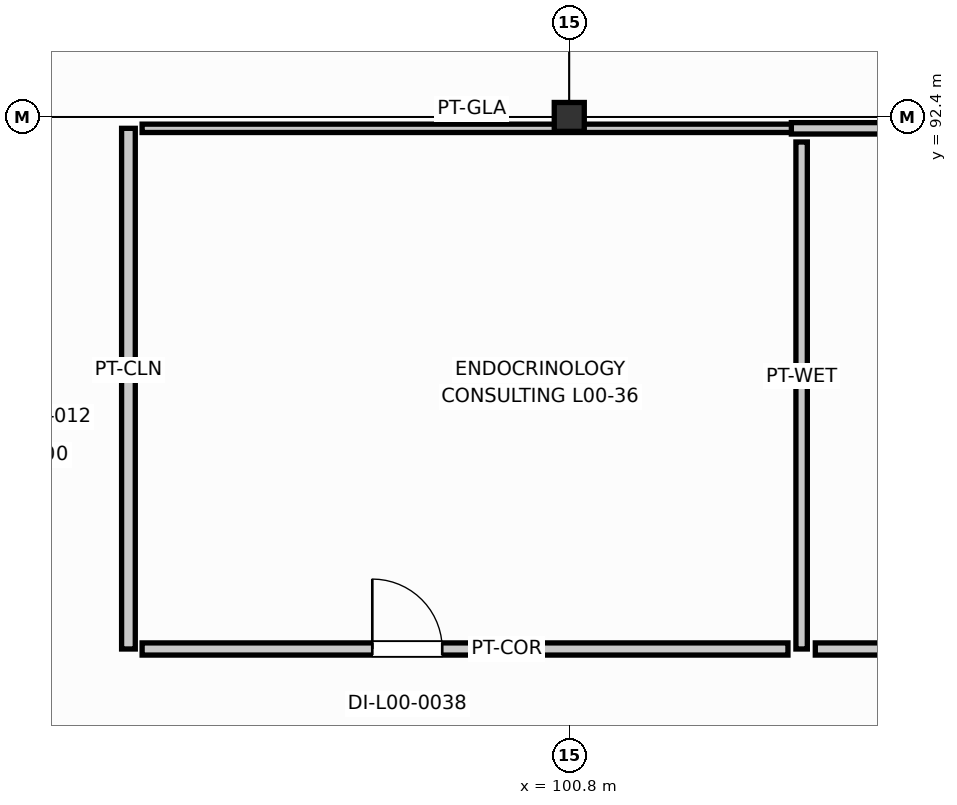
"""IFC4 building model, lengths in metres.
Left out: names, types, materials, properties, quantities, classifications, styles, units other than length and angle.
Written with IfcOpenShell. Run it as: python <this file> out.ifc"""

import sys

from ifc_helpers import new_model, si_unit, direction, frame, frame_2d, origin, origin_2d, place, context, subcontext, project, spatial, rectangle, i_section, extrude, element, fill, save


model = new_model("IFC4")
c1 = context("Model", 3, precision=1e-05, world=origin(), true_north=direction((0.0, 1.0)))
c2 = subcontext(c1, "Body", "Model", "MODEL_VIEW")
j1 = project(units=[si_unit("LENGTHUNIT", "METRE"), si_unit("PLANEANGLEUNIT", "RADIAN")], contexts=[c1])
p1 = place(None, origin())
s1 = spatial("IfcSite", under=j1, at=p1, CompositionType="ELEMENT")
p2 = place(p1, origin())
s2 = spatial("IfcBuilding", under=s1, at=p2, CompositionType="ELEMENT")
p3 = place(p2, origin())
s3 = spatial("IfcBuildingStorey", under=s2, at=p3, CompositionType="ELEMENT", Elevation=0.0)
p4 = place(p3, frame((100.8, 92.4, 0.0), z_axis=(0.0, 0.0, 1.0), x_axis=(1.0, 0.0, 0.0)))
e1 = element("IfcColumn", 1, at=p4, inside=s3, PredefinedType="COLUMN", context=c2, shape_type="SweptSolid", body=[
    extrude(i_section(OverallWidth=0.395, OverallDepth=0.38, WebThickness=0.019, FlangeThickness=0.03, FilletRadius=0.02, at=origin_2d()), origin(), (0.0, 0.0, 1.0), 4.8),
])
p5 = place(p3, frame((95.0, 85.4, 0.0), z_axis=(0.0, 0.0, 1.0), x_axis=(0.0, 1.0, 0.0)))
e2 = element("IfcWall", 2, at=p5, inside=s3, PredefinedType="PARTITIONING", context=c2, shape_type="SweptSolid", body=[
    extrude(rectangle(XDim=6.85, YDim=0.18, at=frame_2d((3.425, 0.0))), origin(), (0.0, 0.0, 1.0), 3.928),
])
p6 = place(p3, frame((95.18, 92.25, 0.0), z_axis=(0.0, 0.0, 1.0), x_axis=(1.0, 0.0, 0.0)))
e3 = element("IfcWall", 3, at=p6, inside=s3, PredefinedType="MOVABLE", context=c2, shape_type="SweptSolid", body=[
    extrude(rectangle(XDim=8.677, YDim=0.11, at=frame_2d((4.339, 0.0))), origin(), (0.0, 0.0, 1.0), 3.694),
])
p7 = place(p3, frame((103.857, 92.07, 0.0), z_axis=(0.0, 0.0, 1.0), x_axis=(0.0, -1.0, 0.0)))
e4 = element("IfcWall", 4, at=p7, inside=s3, PredefinedType="PLUMBINGWALL", context=c2, shape_type="SweptSolid", body=[
    extrude(rectangle(XDim=6.67, YDim=0.15, at=frame_2d((3.335, 0.0))), origin(), (0.0, 0.0, 1.0), 4.545),
])
p8 = place(p3, frame((103.677, 85.4, 0.0), z_axis=(0.0, 0.0, 1.0), x_axis=(-1.0, 0.0, 0.0)))
e5 = element("IfcWall", 5, at=p8, inside=s3, PredefinedType="PARTITIONING", context=c2, shape_type="SweptSolid", body=[
    extrude(rectangle(XDim=8.497, YDim=0.16, at=frame_2d((4.249, 0.0))), origin(), (0.0, 0.0, 1.0), 3.694),
])
p9 = place(p8, frame((4.549, 0.0, 0.0)))
e6 = element("IfcOpeningElement", 6, at=p9, cuts=e5, PredefinedType="OPENING", context=c2, shape_type="SweptSolid", body=[
    extrude(rectangle(XDim=0.92, YDim=2.1, at=frame_2d((0.46, 1.05))), frame((0.0, 0.09, 0.0), z_axis=(0.0, -1.0, 0.0), x_axis=(1.0, 0.0, 0.0)), (0.0, 0.0, 1.0), 0.18),
])
p10 = place(p3, frame((103.722, 92.25, 0.0), z_axis=(0.0, 0.0, 1.0), x_axis=(1.0, 0.0, 0.0)))
e7 = element("IfcWall", 7, at=p10, inside=s3, PredefinedType="PLUMBINGWALL", context=c2, shape_type="SweptSolid", body=[
    extrude(rectangle(XDim=8.992, YDim=0.15, at=frame_2d((4.496, 0.0))), origin(), (0.0, 0.0, 1.0), 3.928),
])
p11 = place(p3, frame((112.534, 85.4, 0.0), z_axis=(0.0, 0.0, 1.0), x_axis=(-1.0, 0.0, 0.0)))
e8 = element("IfcWall", 8, at=p11, inside=s3, PredefinedType="PARTITIONING", context=c2, shape_type="SweptSolid", body=[
    extrude(rectangle(XDim=8.497, YDim=0.16, at=frame_2d((4.249, 0.0))), origin(), (0.0, 0.0, 1.0), 3.928),
])
p12 = place(p11, frame((2.519, 0.0, 0.0)))
e9 = element("IfcOpeningElement", 9, at=p12, cuts=e8, PredefinedType="OPENING", context=c2, shape_type="SweptSolid", body=[
    extrude(rectangle(XDim=1.06, YDim=2.05, at=frame_2d((0.53, 1.025))), frame((0.0, 0.09, 0.0), z_axis=(0.0, -1.0, 0.0), x_axis=(1.0, 0.0, 0.0)), (0.0, 0.0, 1.0), 0.18),
])
p13 = place(p9, frame((0.92, 0.0, 0.0), z_axis=(0.0, 0.0, 1.0), x_axis=(-1.0, 0.0, 0.0)))
e10 = element("IfcDoor", 10, at=p13, inside=s3, OperationType="SINGLE_SWING_LEFT", PredefinedType="DOOR", context=c2, shape_type="SweptSolid", body=[
    extrude(rectangle(XDim=0.92, YDim=2.1, at=frame_2d((0.46, 1.05))), frame((0.0, 0.025, 0.0), z_axis=(0.0, -1.0, 0.0), x_axis=(1.0, 0.0, 0.0)), (0.0, 0.0, 1.0), 0.05),
])
fill(e6, e10)
save(model, sys.argv[1])
